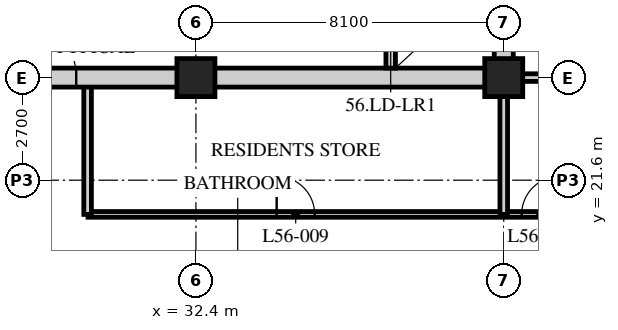
"""IFC4 building model, lengths in metres.
Left out: names, types, materials, properties, quantities, classifications, styles, units other than length and angle.
Written with IfcOpenShell. Run it as: python <this file> out.ifc"""

import sys

from ifc_helpers import new_model, si_unit, direction, frame, frame_2d, origin, origin_2d, place, context, subcontext, project, spatial, rectangle, hollow_rectangle, extrude, element, fill, save


model = new_model("IFC4")
c1 = context("Model", 3, precision=1e-05, world=origin(), true_north=direction((0.0, 1.0)))
c2 = subcontext(c1, "Body", "Model", "MODEL_VIEW")
j1 = project(units=[si_unit("LENGTHUNIT", "METRE"), si_unit("PLANEANGLEUNIT", "RADIAN")], contexts=[c1])
p1 = place(None, origin())
s1 = spatial("IfcSite", under=j1, at=p1, CompositionType="ELEMENT")
p2 = place(p1, origin())
s2 = spatial("IfcBuilding", under=s1, at=p2, CompositionType="ELEMENT")
p3 = place(p2, frame((0.0, 0.0, 217.2)))
s3 = spatial("IfcBuildingStorey", under=s2, at=p3, CompositionType="ELEMENT", Elevation=217.2)
for number, where, z_axis, x_axis in (
    (1, (32.4, 24.3, 0.0), (0.0, 0.0, 1.0), (1.0, 0.0, 0.0)),
    (2, (40.5, 24.3, 0.0), (0.0, 0.0, 1.0), (1.0, 0.0, 0.0)),
):
    element("IfcColumn", number, at=place(p3, frame(where, z_axis=z_axis, x_axis=x_axis)), inside=s3, PredefinedType="COLUMN", context=c2, shape_type="SweptSolid", body=[
        extrude(hollow_rectangle(XDim=1.0, YDim=1.0, WallThickness=0.1, at=origin_2d()), origin(), (0.0, 0.0, 1.0), 3.6),
    ])
p4 = place(p3, frame((29.56, 20.7, 0.0), z_axis=(0.0, 0.0, 1.0), x_axis=(1.0, 0.0, 0.0)))
e3 = element("IfcWall", 3, at=p4, inside=s3, PredefinedType="PARTITIONING", context=c2, shape_type="SweptSolid", body=[
    extrude(rectangle(XDim=17.24, YDim=0.15, at=frame_2d((8.62, 0.0))), origin(), (0.0, 0.0, 1.0), 3.39),
])
p5 = place(p4, frame((4.965, 0.0, 0.0)))
e4 = element("IfcOpeningElement", 4, at=p5, cuts=e3, PredefinedType="OPENING", context=c2, shape_type="SweptSolid", body=[
    extrude(rectangle(XDim=1.0, YDim=2.1, at=frame_2d((0.5, 1.05))), frame((0.0, 0.085, 0.0), z_axis=(0.0, -1.0, 0.0), x_axis=(1.0, 0.0, 0.0)), (0.0, 0.0, 1.0), 0.17),
])
p6 = place(p4, frame((11.412, 0.0, 0.0)))
e5 = element("IfcOpeningElement", 5, at=p6, cuts=e3, PredefinedType="OPENING", context=c2, shape_type="SweptSolid", body=[
    extrude(rectangle(XDim=1.0, YDim=2.1, at=frame_2d((0.5, 1.05))), frame((0.0, 0.085, 0.0), z_axis=(0.0, -1.0, 0.0), x_axis=(1.0, 0.0, 0.0)), (0.0, 0.0, 1.0), 0.17),
])
p7 = place(p4, frame((14.562, 0.0, 0.0)))
e6 = element("IfcOpeningElement", 6, at=p7, cuts=e3, PredefinedType="OPENING", context=c2, shape_type="SweptSolid", body=[
    extrude(rectangle(XDim=1.0, YDim=2.1, at=frame_2d((0.5, 1.05))), frame((0.0, 0.085, 0.0), z_axis=(0.0, -1.0, 0.0), x_axis=(1.0, 0.0, 0.0)), (0.0, 0.0, 1.0), 0.17),
])
p8 = place(p3, frame((40.5, 20.7, 0.0), z_axis=(0.0, 0.0, 1.0), x_axis=(0.0, 1.0, 0.0)))
e7 = element("IfcWall", 7, at=p8, inside=s3, PredefinedType="SOLIDWALL", context=c2, shape_type="SweptSolid", body=[
    extrude(rectangle(XDim=3.6, YDim=0.2, at=frame_2d((1.8, 0.0))), origin(), (0.0, 0.0, 1.0), 2.778),
])
p9 = place(p3, frame((29.55, 20.7, 0.0), z_axis=(0.0, 0.0, 1.0), x_axis=(0.0, 1.0, 0.0)))
e8 = element("IfcWall", 8, at=p9, inside=s3, PredefinedType="SOLIDWALL", context=c2, shape_type="SweptSolid", body=[
    extrude(rectangle(XDim=3.6, YDim=0.2, at=frame_2d((1.8, 0.0))), origin(), (0.0, 0.0, 1.0), 3.39),
])
p10 = place(p3, frame((40.5, 24.3, 0.0), z_axis=(0.0, 0.0, 1.0), x_axis=(1.0, 0.0, 0.0)))
e9 = element("IfcWall", 9, at=p10, inside=s3, PredefinedType="SOLIDWALL", context=c2, shape_type="SweptSolid", body=[
    extrude(rectangle(XDim=6.3, YDim=0.2, at=frame_2d((3.15, 0.0))), origin(), (0.0, 0.0, 1.0), 3.39),
])
p11 = place(p3, frame((15.95, 24.3, 0.0), z_axis=(0.0, 0.0, 1.0), x_axis=(1.0, 0.0, 0.0)))
e10 = element("IfcWall", 10, at=p11, inside=s3, PredefinedType="SOLIDWALL", context=c2, shape_type="SweptSolid", body=[
    extrude(rectangle(XDim=24.8, YDim=0.5, at=frame_2d((12.4, 0.0))), origin(), (0.0, 0.0, 1.0), 2.74),
])
p12 = place(p11, frame((11.5, 0.0, 0.0)))
e11 = element("IfcOpeningElement", 11, at=p12, cuts=e10, PredefinedType="OPENING", context=c2, shape_type="SweptSolid", body=[
    extrude(rectangle(XDim=1.8, YDim=2.4, at=frame_2d((0.9, 1.2))), frame((0.0, 0.26, 0.0), z_axis=(0.0, -1.0, 0.0), x_axis=(1.0, 0.0, 0.0)), (0.0, 0.0, 1.0), 0.52),
])
p13 = place(p3, frame((40.5, 24.55, 0.0), z_axis=(0.0, 0.0, 1.0), x_axis=(0.0, 1.0, 0.0)))
e12 = element("IfcWall", 12, at=p13, inside=s3, PredefinedType="SOLIDWALL", context=c2, shape_type="SweptSolid", body=[
    extrude(rectangle(XDim=15.7, YDim=0.5, at=frame_2d((7.85, 0.0))), origin(), (0.0, 0.0, 1.0), 2.778),
])
p14 = place(p3, frame((37.525, 24.55, 0.0), z_axis=(0.0, 0.0, 1.0), x_axis=(0.0, 1.0, 0.0)))
e13 = element("IfcWall", 13, at=p14, inside=s3, PredefinedType="SOLIDWALL", context=c2, shape_type="SweptSolid", body=[
    extrude(rectangle(XDim=7.75, YDim=0.25, at=frame_2d((3.875, 0.0))), origin(), (0.0, 0.0, 1.0), 3.39),
])
p15 = place(p14, frame((0.65, 0.0, 0.0)))
e14 = element("IfcOpeningElement", 14, at=p15, cuts=e13, PredefinedType="OPENING", context=c2, shape_type="SweptSolid", body=[
    extrude(rectangle(XDim=1.1, YDim=2.4, at=frame_2d((0.55, 1.2))), frame((0.0, 0.135, 0.0), z_axis=(0.0, -1.0, 0.0), x_axis=(1.0, 0.0, 0.0)), (0.0, 0.0, 1.0), 0.27),
])
p16 = place(p14, frame((3.25, 0.0, 0.0)))
e15 = element("IfcOpeningElement", 15, at=p16, cuts=e13, PredefinedType="OPENING", context=c2, shape_type="SweptSolid", body=[
    extrude(rectangle(XDim=1.1, YDim=2.4, at=frame_2d((0.55, 1.2))), frame((0.0, 0.135, 0.0), z_axis=(0.0, -1.0, 0.0), x_axis=(1.0, 0.0, 0.0)), (0.0, 0.0, 1.0), 0.27),
])
p17 = place(p14, frame((5.85, 0.0, 0.0)))
e16 = element("IfcOpeningElement", 16, at=p17, cuts=e13, PredefinedType="OPENING", context=c2, shape_type="SweptSolid", body=[
    extrude(rectangle(XDim=1.1, YDim=2.4, at=frame_2d((0.55, 1.2))), frame((0.0, 0.135, 0.0), z_axis=(0.0, -1.0, 0.0), x_axis=(1.0, 0.0, 0.0)), (0.0, 0.0, 1.0), 0.27),
])
p18 = place(p5, origin())
e17 = element("IfcDoor", 17, at=p18, inside=s3, OperationType="SINGLE_SWING_LEFT", PredefinedType="DOOR", context=c2, shape_type="SweptSolid", body=[
    extrude(rectangle(XDim=1.0, YDim=2.1, at=frame_2d((0.5, 1.05))), frame((0.0, 0.025, 0.0), z_axis=(0.0, -1.0, 0.0), x_axis=(1.0, 0.0, 0.0)), (0.0, 0.0, 1.0), 0.05),
])
fill(e4, e17)
p19 = place(p6, origin())
e18 = element("IfcDoor", 18, at=p19, inside=s3, OperationType="SINGLE_SWING_RIGHT", PredefinedType="DOOR", context=c2, shape_type="SweptSolid", body=[
    extrude(rectangle(XDim=1.0, YDim=2.1, at=frame_2d((0.5, 1.05))), frame((0.0, 0.025, 0.0), z_axis=(0.0, -1.0, 0.0), x_axis=(1.0, 0.0, 0.0)), (0.0, 0.0, 1.0), 0.05),
])
fill(e5, e18)
p20 = place(p12, origin())
e19 = element("IfcDoor", 19, at=p20, inside=s3, OperationType="DOUBLE_DOOR_SINGLE_SWING", PredefinedType="DOOR", context=c2, shape_type="SweptSolid", body=[
    extrude(rectangle(XDim=1.8, YDim=2.4, at=frame_2d((0.9, 1.2))), frame((0.0, 0.025, 0.0), z_axis=(0.0, -1.0, 0.0), x_axis=(1.0, 0.0, 0.0)), (0.0, 0.0, 1.0), 0.05),
])
fill(e11, e19)
save(model, sys.argv[1])
